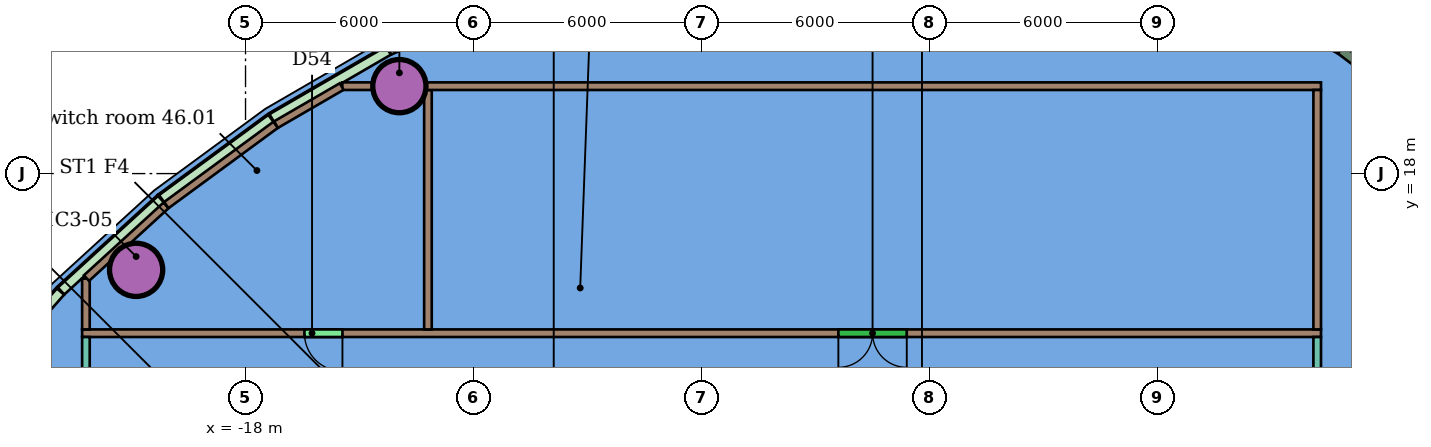
"""IFC4 building model, lengths in metres.
Left out: names, types, materials, properties, quantities, classifications, styles, units other than length and angle.
Written with IfcOpenShell. Run it as: python <this file> out.ifc"""

import sys

from ifc_helpers import new_model, si_unit, direction, frame, frame_2d, origin, origin_2d, place, context, subcontext, project, spatial, rectangle, hollow_circle, extrude, element, fill, save


model = new_model("IFC4")
c1 = context("Model", 3, precision=1e-05, world=origin(), true_north=direction((0.0, 1.0)))
c2 = subcontext(c1, "Body", "Model", "MODEL_VIEW")
j1 = project(units=[si_unit("LENGTHUNIT", "METRE"), si_unit("PLANEANGLEUNIT", "RADIAN")], contexts=[c1])
p1 = place(None, origin())
s1 = spatial("IfcSite", under=j1, at=p1, CompositionType="ELEMENT")
p2 = place(p1, origin())
s2 = spatial("IfcBuilding", under=s1, at=p2, CompositionType="ELEMENT")
p3 = place(p2, frame((0.0, 0.0, 190.2)))
s3 = spatial("IfcBuildingStorey", under=s2, at=p3, CompositionType="ELEMENT", Elevation=190.2)
for number, where, z_axis, x_axis in (
    (1, (-13.952, 20.301, 0.0), (0.0, 0.0, 1.0), (1.0, 0.0, 0.0)),
    (2, (-20.879, 15.467, 0.0), (0.0, 0.0, 1.0), (1.0, 0.0, 0.0)),
):
    element("IfcColumn", number, at=place(p3, frame(where, z_axis=z_axis, x_axis=x_axis)), inside=s3, PredefinedType="COLUMN", context=c2, shape_type="SweptSolid", body=[
        extrude(hollow_circle(Radius=0.7, WallThickness=0.05, at=origin_2d()), origin(), (0.0, 0.0, 1.0), 5.35),
    ])
p4 = place(p3, frame((10.3, 13.8, 0.0), z_axis=(0.0, 0.0, 1.0), x_axis=(-1.0, 0.0, 0.0)))
e3 = element("IfcWall", 3, at=p4, inside=s3, PredefinedType="PARTITIONING", context=c2, shape_type="SweptSolid", body=[
    extrude(rectangle(XDim=32.6, YDim=0.2, at=frame_2d((16.3, 0.0))), origin(), (0.0, 0.0, 1.0), 4.95),
])
p5 = place(p4, frame((25.75, 0.0, 0.0)))
e4 = element("IfcOpeningElement", 4, at=p5, cuts=e3, PredefinedType="OPENING", context=c2, shape_type="SweptSolid", body=[
    extrude(rectangle(XDim=1.0, YDim=2.1, at=frame_2d((0.5, 1.05))), frame((0.0, 0.11, 0.0), z_axis=(0.0, -1.0, 0.0), x_axis=(1.0, 0.0, 0.0)), (0.0, 0.0, 1.0), 0.22),
])
p6 = place(p4, frame((10.9, 0.0, 0.0)))
e5 = element("IfcOpeningElement", 5, at=p6, cuts=e3, PredefinedType="OPENING", context=c2, shape_type="SweptSolid", body=[
    extrude(rectangle(XDim=1.8, YDim=2.4, at=frame_2d((0.9, 1.2))), frame((0.0, 0.11, 0.0), z_axis=(0.0, -1.0, 0.0), x_axis=(1.0, 0.0, 0.0)), (0.0, 0.0, 1.0), 0.22),
])
p7 = place(p3, frame((10.2, -13.7, 0.0), z_axis=(0.0, 0.0, 1.0), x_axis=(0.0, 1.0, 0.0)))
e6 = element("IfcWall", 6, at=p7, inside=s3, PredefinedType="PARTITIONING", context=c2, shape_type="SweptSolid", body=[
    extrude(rectangle(XDim=27.4, YDim=0.2, at=frame_2d((13.7, 0.0))), origin(), (0.0, 0.0, 1.0), 4.95),
])
p8 = place(p7, frame((13.932, 0.0, 0.0)))
e7 = element("IfcOpeningElement", 7, at=p8, cuts=e6, PredefinedType="OPENING", context=c2, shape_type="SweptSolid", body=[
    extrude(rectangle(XDim=1.8, YDim=2.4, at=frame_2d((0.9, 1.2))), frame((0.0, 0.11, 0.0), z_axis=(0.0, -1.0, 0.0), x_axis=(1.0, 0.0, 0.0)), (0.0, 0.0, 1.0), 0.22),
])
p9 = place(p7, frame((10.914, 0.0, 0.0)))
e8 = element("IfcOpeningElement", 8, at=p9, cuts=e6, PredefinedType="OPENING", context=c2, shape_type="SweptSolid", body=[
    extrude(rectangle(XDim=1.8, YDim=2.4, at=frame_2d((0.9, 1.2))), frame((0.0, 0.11, 0.0), z_axis=(0.0, -1.0, 0.0), x_axis=(1.0, 0.0, 0.0)), (0.0, 0.0, 1.0), 0.22),
])
p10 = place(p3, frame((-22.2, 13.7, 0.0), z_axis=(0.0, 0.0, 1.0), x_axis=(0.0, -1.0, 0.0)))
e9 = element("IfcWall", 9, at=p10, inside=s3, PredefinedType="PARTITIONING", context=c2, shape_type="SweptSolid", body=[
    extrude(rectangle(XDim=27.4, YDim=0.2, at=frame_2d((13.7, 0.0))), origin(), (0.0, 0.0, 1.0), 4.95),
])
p11 = place(p10, frame((13.932, 0.0, 0.0)))
e10 = element("IfcOpeningElement", 10, at=p11, cuts=e9, PredefinedType="OPENING", context=c2, shape_type="SweptSolid", body=[
    extrude(rectangle(XDim=1.8, YDim=2.4, at=frame_2d((0.9, 1.2))), frame((0.0, 0.11, 0.0), z_axis=(0.0, -1.0, 0.0), x_axis=(1.0, 0.0, 0.0)), (0.0, 0.0, 1.0), 0.22),
])
p12 = place(p10, frame((10.914, 0.0, 0.0)))
e11 = element("IfcOpeningElement", 11, at=p12, cuts=e9, PredefinedType="OPENING", context=c2, shape_type="SweptSolid", body=[
    extrude(rectangle(XDim=1.8, YDim=2.4, at=frame_2d((0.9, 1.2))), frame((0.0, 0.11, 0.0), z_axis=(0.0, -1.0, 0.0), x_axis=(1.0, 0.0, 0.0)), (0.0, 0.0, 1.0), 0.22),
])
p13 = place(p3, frame((-13.2, 13.9, 0.0), z_axis=(0.0, 0.0, 1.0), x_axis=(0.0, 1.0, 0.0)))
e12 = element("IfcWall", 12, at=p13, inside=s3, PredefinedType="PARTITIONING", context=c2, shape_type="SweptSolid", body=[
    extrude(rectangle(XDim=6.3, YDim=0.2, at=frame_2d((3.15, 0.0))), origin(), (0.0, 0.0, 1.0), 4.95),
])
p14 = place(p3, frame((-15.453, 20.3, 0.0), z_axis=(0.0, 0.0, 1.0), x_axis=(1.0, 0.0, 0.0)))
e13 = element("IfcWall", 13, at=p14, inside=s3, PredefinedType="PARTITIONING", context=c2, shape_type="SweptSolid", body=[
    extrude(rectangle(XDim=25.753, YDim=0.2, at=frame_2d((12.876, 0.0))), origin(), (0.0, 0.0, 1.0), 4.95),
])
p15 = place(p3, frame((-22.2, 13.9, 0.0), z_axis=(0.0, 0.0, 1.0), x_axis=(0.0, 1.0, 0.0)))
e14 = element("IfcWall", 14, at=p15, inside=s3, PredefinedType="PARTITIONING", context=c2, shape_type="SweptSolid", body=[
    extrude(rectangle(XDim=1.337, YDim=0.2, at=frame_2d((0.668, 0.0))), origin(), (0.0, 0.0, 1.0), 4.95),
])
p16 = place(p3, frame((10.2, 13.9, 0.0), z_axis=(0.0, 0.0, 1.0), x_axis=(0.0, 1.0, 0.0)))
e15 = element("IfcWall", 15, at=p16, inside=s3, PredefinedType="PARTITIONING", context=c2, shape_type="SweptSolid", body=[
    extrude(rectangle(XDim=6.3, YDim=0.2, at=frame_2d((3.15, 0.0))), origin(), (0.0, 0.0, 1.0), 4.95),
])
p17 = place(p3, frame((-22.185, 15.25, 0.0), z_axis=(0.0, 0.0, 1.0), x_axis=(0.738075353994, 0.674718290716, 0.0)))
e16 = element("IfcWall", 16, at=p17, inside=s3, PredefinedType="PARTITIONING", context=c2, shape_type="SweptSolid", body=[
    extrude(rectangle(XDim=2.836, YDim=0.2, at=frame_2d((1.418, 0.0))), origin(), (0.0, 0.0, 1.0), 4.95),
])
p18 = place(p3, frame((-20.084, 17.171, 0.0), z_axis=(0.0, 0.0, 1.0), x_axis=(0.806082962998, 0.591802548798, 0.0)))
e17 = element("IfcWall", 17, at=p18, inside=s3, PredefinedType="PARTITIONING", context=c2, shape_type="SweptSolid", body=[
    extrude(rectangle(XDim=3.568, YDim=0.2, at=frame_2d((1.784, 0.0))), origin(), (0.0, 0.0, 1.0), 4.95),
])
p19 = place(p3, frame((-17.198, 19.288, 0.0), z_axis=(0.0, 0.0, 1.0), x_axis=(0.865096957825, 0.501604678569, 0.0)))
e18 = element("IfcWall", 18, at=p19, inside=s3, PredefinedType="PARTITIONING", context=c2, shape_type="SweptSolid", body=[
    extrude(rectangle(XDim=1.998, YDim=0.2, at=frame_2d((0.999, 0.0))), origin(), (0.0, 0.0, 1.0), 4.95),
])
p20 = place(p3, frame((13.154, 19.5, 0.0), z_axis=(0.0, 0.0, 1.0), x_axis=(-0.798715416711, 0.601708968779, 0.0)))
e19 = element("IfcWall", 19, at=p20, inside=s3, PredefinedType="SOLIDWALL", context=c2, shape_type="SweptSolid", body=[
    extrude(rectangle(XDim=2.923, YDim=0.25, at=frame_2d((1.462, 0.0))), origin(), (0.0, 0.0, 1.0), 5.35),
])
p21 = place(p3, frame((10.796, 21.274, 0.0), z_axis=(0.0, 0.0, 1.0), x_axis=(-0.881818008651, 0.471589863779, 0.0)))
e20 = element("IfcWall", 20, at=p21, inside=s3, PredefinedType="SOLIDWALL", context=c2, shape_type="SweptSolid", body=[
    extrude(rectangle(XDim=2.972, YDim=0.25, at=frame_2d((1.486, 0.0))), origin(), (0.0, 0.0, 1.0), 5.0),
])
p22 = place(p3, frame((-11.01, 22.662, 0.0), z_axis=(0.0, 0.0, 1.0), x_axis=(-0.914847485541, -0.403799552005, 0.0)))
e21 = element("IfcWall", 21, at=p22, inside=s3, PredefinedType="SOLIDWALL", context=c2, shape_type="SweptSolid", body=[
    extrude(rectangle(XDim=3.508, YDim=0.25, at=frame_2d((1.754, 0.0))), origin(), (0.0, 0.0, 1.0), 5.0),
])
p23 = place(p3, frame((-14.239, 21.236, 0.0), z_axis=(0.0, 0.0, 1.0), x_axis=(-0.865113604566, -0.501575967521, 0.0)))
e22 = element("IfcWall", 22, at=p23, inside=s3, PredefinedType="SOLIDWALL", context=c2, shape_type="SweptSolid", body=[
    extrude(rectangle(XDim=3.548, YDim=0.25, at=frame_2d((1.774, 0.0))), origin(), (0.0, 0.0, 1.0), 5.0),
])
p24 = place(p3, frame((-17.326, 19.444, 0.0), z_axis=(0.0, 0.0, 1.0), x_axis=(-0.806074287732, -0.591814365032, 0.0)))
e23 = element("IfcWall", 23, at=p24, inside=s3, PredefinedType="SOLIDWALL", context=c2, shape_type="SweptSolid", body=[
    extrude(rectangle(XDim=3.569, YDim=0.25, at=frame_2d((1.784, 0.0))), origin(), (0.0, 0.0, 1.0), 5.0),
])
p25 = place(p3, frame((-20.219, 17.319, 0.0), z_axis=(0.0, 0.0, 1.0), x_axis=(-0.738039519503, -0.674757488029, 0.0)))
e24 = element("IfcWall", 24, at=p25, inside=s3, PredefinedType="SOLIDWALL", context=c2, shape_type="SweptSolid", body=[
    extrude(rectangle(XDim=3.569, YDim=0.25, at=frame_2d((1.784, 0.0))), origin(), (0.0, 0.0, 1.0), 5.0),
])
p26 = place(p3, frame((-22.868, 14.896, 0.0), z_axis=(0.0, 0.0, 1.0), x_axis=(-0.661072975462, -0.750321611787, 0.0)))
e25 = element("IfcWall", 25, at=p26, inside=s3, PredefinedType="SOLIDWALL", context=c2, shape_type="SweptSolid", body=[
    extrude(rectangle(XDim=3.548, YDim=0.25, at=frame_2d((1.774, 0.0))), origin(), (0.0, 0.0, 1.0), 5.0),
])
p27 = place(p5, origin())
e26 = element("IfcDoor", 26, at=p27, inside=s3, OperationType="SINGLE_SWING_LEFT", PredefinedType="DOOR", context=c2, shape_type="SweptSolid", body=[
    extrude(rectangle(XDim=1.0, YDim=2.1, at=frame_2d((0.5, 1.05))), frame((0.0, 0.025, 0.0), z_axis=(0.0, -1.0, 0.0), x_axis=(1.0, 0.0, 0.0)), (0.0, 0.0, 1.0), 0.05),
])
fill(e4, e26)
p28 = place(p6, origin())
e27 = element("IfcDoor", 27, at=p28, inside=s3, OperationType="DOUBLE_DOOR_SINGLE_SWING", PredefinedType="DOOR", context=c2, shape_type="SweptSolid", body=[
    extrude(rectangle(XDim=1.8, YDim=2.4, at=frame_2d((0.9, 1.2))), frame((0.0, 0.025, 0.0), z_axis=(0.0, -1.0, 0.0), x_axis=(1.0, 0.0, 0.0)), (0.0, 0.0, 1.0), 0.05),
])
fill(e5, e27)
save(model, sys.argv[1])
